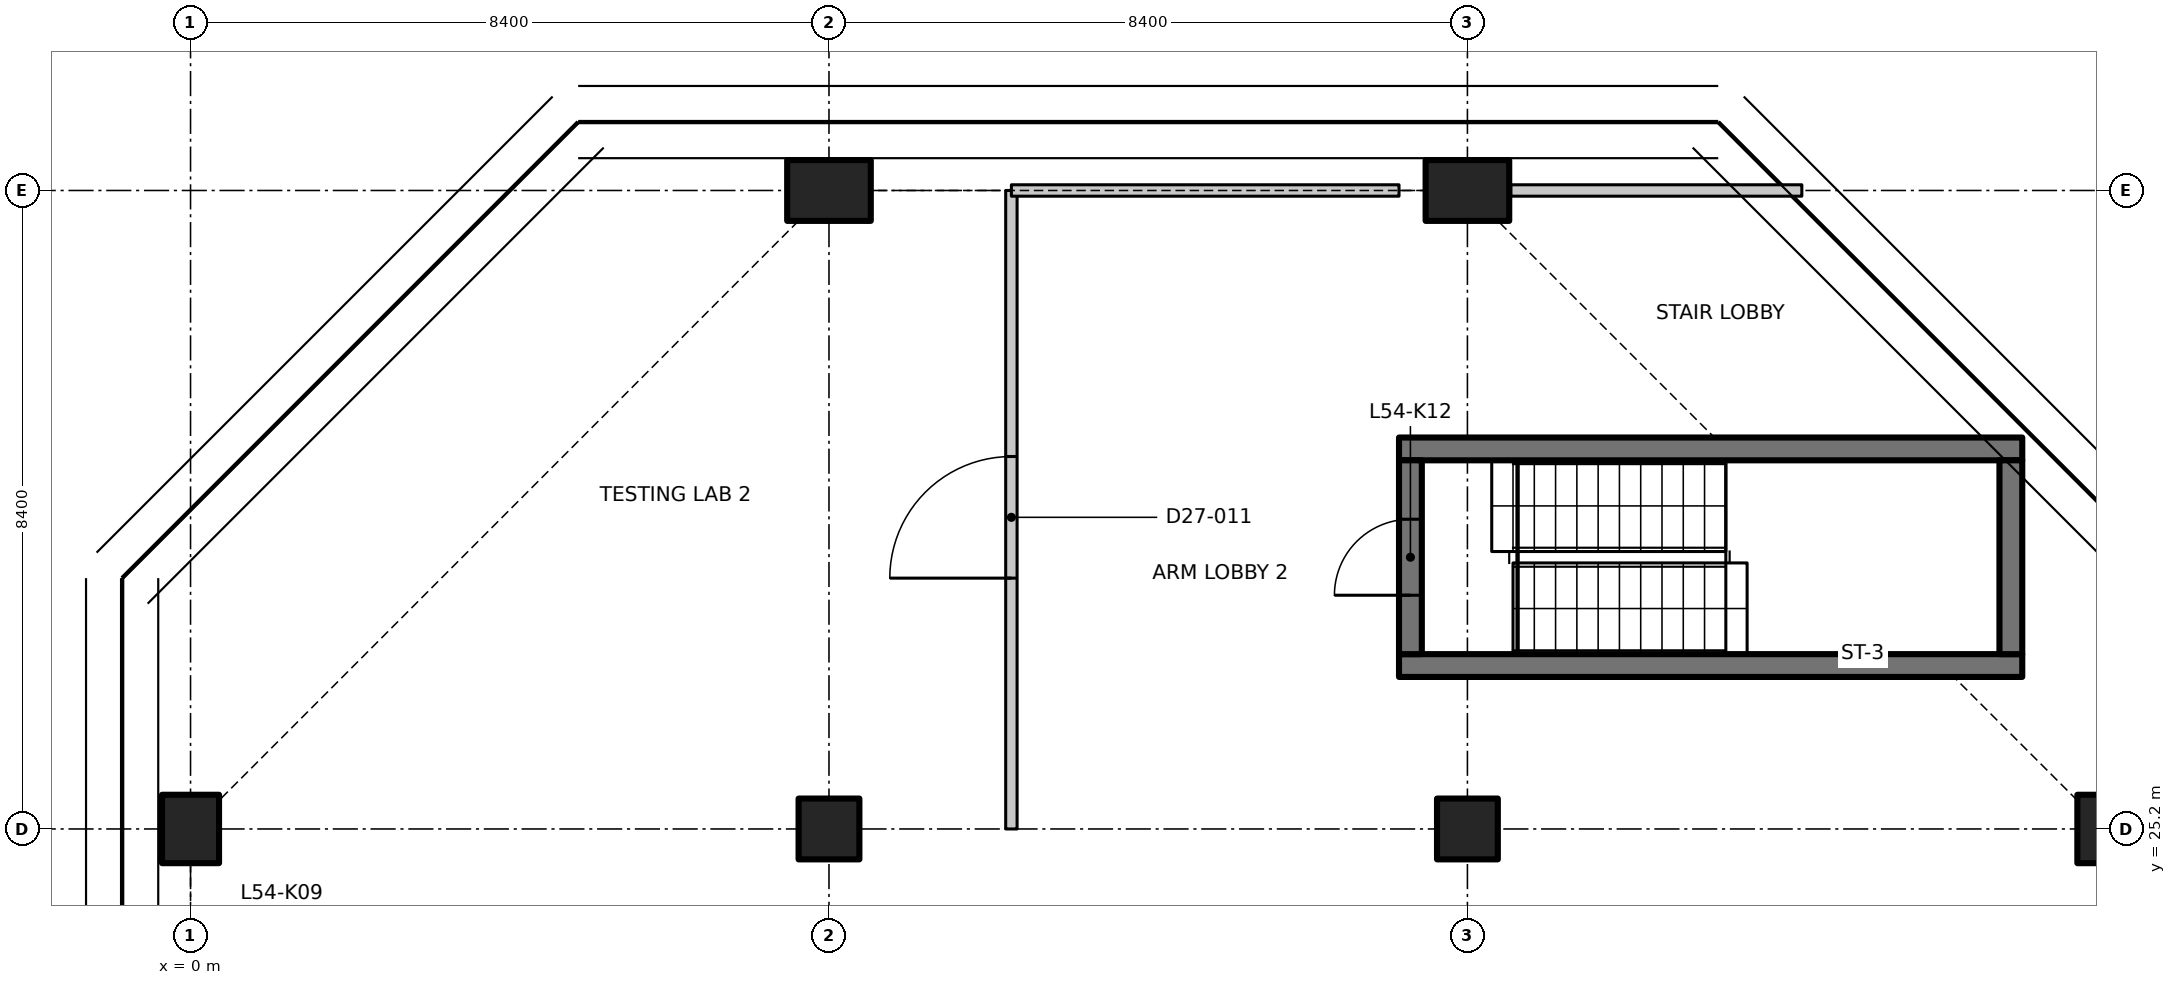
"""IFC4 building model, lengths in metres.
Left out: names, types, materials, properties, quantities, classifications, styles, units other than length and angle.
Written with IfcOpenShell. Run it as: python <this file> out.ifc"""

import sys

from ifc_helpers import new_model, si_unit, direction, frame, frame_2d, origin, origin_2d, place, context, subcontext, project, spatial, polyline, rectangle, outline, extrude, element, fill, save


model = new_model("IFC4")
c1 = context("Model", 3, precision=1e-05, world=origin(), true_north=direction((0.0, 1.0)))
c2 = subcontext(c1, "Body", "Model", "MODEL_VIEW")
j1 = project(units=[si_unit("LENGTHUNIT", "METRE"), si_unit("PLANEANGLEUNIT", "RADIAN")], contexts=[c1])
p1 = place(None, origin())
s1 = spatial("IfcSite", under=j1, at=p1, CompositionType="ELEMENT")
p2 = place(p1, origin())
s2 = spatial("IfcBuilding", under=s1, at=p2, CompositionType="ELEMENT")
p3 = place(p2, frame((0.0, 0.0, 215.7)))
s3 = spatial("IfcBuildingStorey", under=s2, at=p3, CompositionType="ELEMENT", Elevation=215.7)
p4 = place(p3, frame((0.0, 25.2, 0.0), z_axis=(0.0, 0.0, 1.0), x_axis=(1.0, 0.0, 0.0)))
e1 = element("IfcColumn", 1, at=p4, inside=s3, PredefinedType="COLUMN", context=c2, shape_type="SweptSolid", body=[
    extrude(rectangle(XDim=0.75, YDim=0.9, at=origin_2d()), origin(), (0.0, 0.0, 1.0), 3.35),
])
p5 = place(p3, frame((8.4, 25.2, 0.0), z_axis=(0.0, 0.0, 1.0), x_axis=(1.0, 0.0, 0.0)))
e2 = element("IfcColumn", 2, at=p5, inside=s3, PredefinedType="COLUMN", context=c2, shape_type="SweptSolid", body=[
    extrude(rectangle(XDim=0.8, YDim=0.8, at=origin_2d()), origin(), (0.0, 0.0, 1.0), 3.35),
])
p6 = place(p3, frame((8.4, 33.6, 0.0), z_axis=(0.0, 0.0, 1.0), x_axis=(0.0, 1.0, 0.0)))
e3 = element("IfcColumn", 3, at=p6, inside=s3, PredefinedType="COLUMN", context=c2, shape_type="SweptSolid", body=[
    extrude(rectangle(XDim=0.8, YDim=1.1, at=origin_2d()), origin(), (0.0, 0.0, 1.0), 3.35),
])
p7 = place(p3, frame((16.8, 25.2, 0.0), z_axis=(0.0, 0.0, 1.0), x_axis=(1.0, 0.0, 0.0)))
e4 = element("IfcColumn", 4, at=p7, inside=s3, PredefinedType="COLUMN", context=c2, shape_type="SweptSolid", body=[
    extrude(rectangle(XDim=0.8, YDim=0.8, at=origin_2d()), origin(), (0.0, 0.0, 1.0), 3.35),
])
p8 = place(p3, frame((16.8, 33.6, 0.0), z_axis=(0.0, 0.0, 1.0), x_axis=(0.0, 1.0, 0.0)))
e5 = element("IfcColumn", 5, at=p8, inside=s3, PredefinedType="COLUMN", context=c2, shape_type="SweptSolid", body=[
    extrude(rectangle(XDim=0.8, YDim=1.1, at=origin_2d()), origin(), (0.0, 0.0, 1.0), 3.35),
])
p9 = place(p3, frame((25.2, 25.2, 0.0), z_axis=(0.0, 0.0, 1.0), x_axis=(1.0, 0.0, 0.0)))
e6 = element("IfcColumn", 6, at=p9, inside=s3, PredefinedType="COLUMN", context=c2, shape_type="SweptSolid", body=[
    extrude(rectangle(XDim=0.75, YDim=0.9, at=origin_2d()), origin(), (0.0, 0.0, 1.0), 3.35),
])
for number, where, z_axis, x_axis in (
    (7, (15.9, 27.35, 0.0), (0.0, 0.0, 1.0), (1.0, 0.0, 0.0)),
    (8, (15.9, 30.2, 0.0), (0.0, 0.0, 1.0), (1.0, 0.0, 0.0)),
):
    element("IfcWall", number, at=place(p3, frame(where, z_axis=z_axis, x_axis=x_axis)), inside=s3, PredefinedType="SHEAR", context=c2, shape_type="SweptSolid", body=[
        extrude(rectangle(XDim=8.2, YDim=0.3, at=frame_2d((4.1, 0.0))), origin(), (0.0, 0.0, 1.0), 3.35),
    ])
p10 = place(p3, frame((16.05, 27.5, 0.0), z_axis=(0.0, 0.0, 1.0), x_axis=(0.0, 1.0, 0.0)))
e9 = element("IfcWall", 9, at=p10, inside=s3, PredefinedType="SHEAR", context=c2, shape_type="SweptSolid", body=[
    extrude(rectangle(XDim=2.55, YDim=0.3, at=frame_2d((1.275, 0.0))), origin(), (0.0, 0.0, 1.0), 3.35),
])
p11 = place(p10, frame((0.775, 0.0, 0.0)))
e10 = element("IfcOpeningElement", 10, at=p11, cuts=e9, PredefinedType="OPENING", context=c2, shape_type="SweptSolid", body=[
    extrude(rectangle(XDim=1.0, YDim=2.1, at=frame_2d((0.5, 1.05))), frame((0.0, 0.16, 0.0), z_axis=(0.0, -1.0, 0.0), x_axis=(1.0, 0.0, 0.0)), (0.0, 0.0, 1.0), 0.32),
])
p12 = place(p3, frame((23.95, 27.5, 0.0), z_axis=(0.0, 0.0, 1.0), x_axis=(0.0, 1.0, 0.0)))
e11 = element("IfcWall", 11, at=p12, inside=s3, PredefinedType="SHEAR", context=c2, shape_type="SweptSolid", body=[
    extrude(rectangle(XDim=2.55, YDim=0.3, at=frame_2d((1.275, 0.0))), origin(), (0.0, 0.0, 1.0), 3.35),
])
p13 = place(p3, frame((10.8, 25.2, 0.0), z_axis=(0.0, 0.0, 1.0), x_axis=(0.0, 1.0, 0.0)))
e12 = element("IfcWall", 12, at=p13, inside=s3, PredefinedType="PARTITIONING", context=c2, shape_type="SweptSolid", body=[
    extrude(outline(polyline([(0.0, 0.0), (8.4, 0.0), (8.4, 2.98), (7.952, 2.98), (7.95, 3.33), (0.0, 3.33), (0.0, 0.0)])), frame((0.0, 0.075, 0.0), z_axis=(0.0, -1.0, 0.0), x_axis=(1.0, 0.0, 0.0)), (0.0, 0.0, 1.0), 0.15),
])
p14 = place(p13, frame((3.3, 0.0, 0.0)))
e13 = element("IfcOpeningElement", 13, at=p14, cuts=e12, PredefinedType="OPENING", context=c2, shape_type="SweptSolid", body=[
    extrude(rectangle(XDim=1.6, YDim=2.1, at=frame_2d((0.8, 1.05))), frame((0.0, 0.085, 0.0), z_axis=(0.0, -1.0, 0.0), x_axis=(1.0, 0.0, 0.0)), (0.0, 0.0, 1.0), 0.17),
])
p15 = place(p3, frame((10.8, 33.6, 0.0), z_axis=(0.0, 0.0, 1.0), x_axis=(1.0, 0.0, 0.0)))
e14 = element("IfcWall", 14, at=p15, inside=s3, PredefinedType="PARTITIONING", context=c2, shape_type="SweptSolid", body=[
    extrude(outline(polyline([(0.0, 0.0), (5.1, 0.0), (5.1, 2.98), (0.0, 2.98), (0.0, 0.0)])), frame((0.0, 0.075, 0.0), z_axis=(0.0, -1.0, 0.0), x_axis=(1.0, 0.0, 0.0)), (0.0, 0.0, 1.0), 0.15),
])
p16 = place(p3, frame((17.37, 33.6, 0.0), z_axis=(0.0, 0.0, 1.0), x_axis=(1.0, 0.0, 0.0)))
e15 = element("IfcWall", 15, at=p16, inside=s3, PredefinedType="PARTITIONING", context=c2, shape_type="SweptSolid", body=[
    extrude(rectangle(XDim=3.83, YDim=0.15, at=frame_2d((1.915, 0.0))), origin(), (0.0, 0.0, 1.0), 2.98),
])
p17 = place(p11, origin())
e16 = element("IfcDoor", 16, at=p17, inside=s3, OperationType="SINGLE_SWING_LEFT", PredefinedType="DOOR", context=c2, shape_type="SweptSolid", body=[
    extrude(rectangle(XDim=1.0, YDim=2.1, at=frame_2d((0.5, 1.05))), frame((0.0, 0.025, 0.0), z_axis=(0.0, -1.0, 0.0), x_axis=(1.0, 0.0, 0.0)), (0.0, 0.0, 1.0), 0.05),
])
fill(e10, e16)
p18 = place(p14, origin())
e17 = element("IfcDoor", 17, at=p18, inside=s3, OperationType="DOUBLE_DOOR_SINGLE_SWING", PredefinedType="DOOR", context=c2, shape_type="SweptSolid", body=[
    extrude(rectangle(XDim=1.6, YDim=2.1, at=frame_2d((0.8, 1.05))), frame((0.0, 0.025, 0.0), z_axis=(0.0, -1.0, 0.0), x_axis=(1.0, 0.0, 0.0)), (0.0, 0.0, 1.0), 0.05),
])
fill(e13, e17)
save(model, sys.argv[1])
